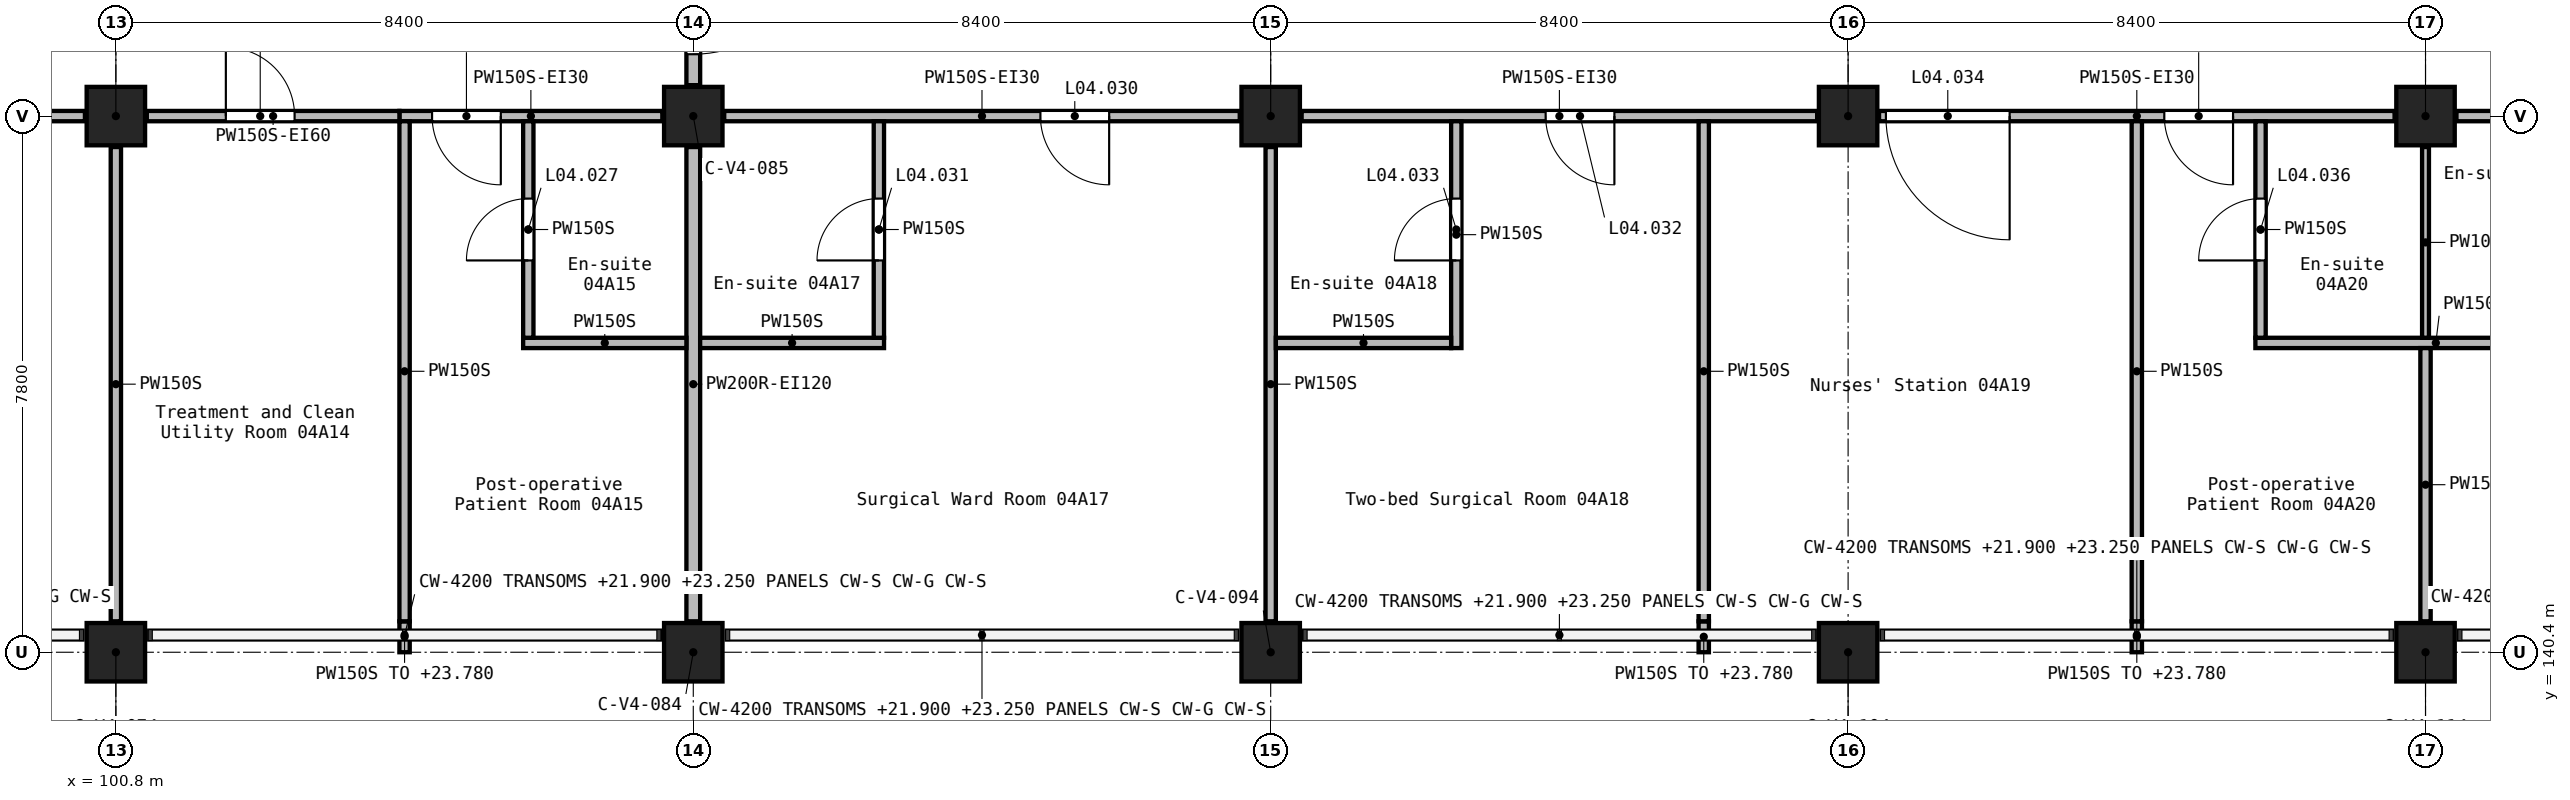
"""IFC4 building model, lengths in metres.
Left out: names, types, materials, properties, quantities, classifications, styles, units other than length and angle.
Written with IfcOpenShell. Run it as: python <this file> out.ifc"""

import sys

from ifc_helpers import new_model, si_unit, direction, frame, frame_2d, origin, origin_2d, place, context, subcontext, project, spatial, rectangle, extrude, element, fill, save


model = new_model("IFC4")
c1 = context("Model", 3, precision=1e-05, world=origin(), true_north=direction((0.0, 1.0)))
c2 = subcontext(c1, "Body", "Model", "MODEL_VIEW")
j1 = project(units=[si_unit("LENGTHUNIT", "METRE"), si_unit("PLANEANGLEUNIT", "RADIAN")], contexts=[c1])
p1 = place(None, origin())
s1 = spatial("IfcSite", under=j1, at=p1, CompositionType="ELEMENT")
p2 = place(p1, origin())
s2 = spatial("IfcBuilding", under=s1, at=p2, CompositionType="ELEMENT")
p3 = place(p2, frame((0.0, 0.0, 21.0)))
s3 = spatial("IfcBuildingStorey", under=s2, at=p3, CompositionType="ELEMENT", Elevation=21.0)
for number, where, z_axis, x_axis in (
    (1, (100.8, 140.4, 0.0), (0.0, 0.0, 1.0), (1.0, 0.0, 0.0)),
    (2, (100.8, 148.2, 0.0), (0.0, 0.0, 1.0), (1.0, 0.0, 0.0)),
    (3, (109.2, 140.4, 0.0), (0.0, 0.0, 1.0), (1.0, 0.0, 0.0)),
    (4, (109.2, 148.2, 0.0), (0.0, 0.0, 1.0), (1.0, 0.0, 0.0)),
    (5, (117.6, 140.4, 0.0), (0.0, 0.0, 1.0), (1.0, 0.0, 0.0)),
    (6, (117.6, 148.2, 0.0), (0.0, 0.0, 1.0), (1.0, 0.0, 0.0)),
    (7, (126.0, 140.4, 0.0), (0.0, 0.0, 1.0), (1.0, 0.0, 0.0)),
    (8, (126.0, 148.2, 0.0), (0.0, 0.0, 1.0), (1.0, 0.0, 0.0)),
    (9, (134.4, 140.4, 0.0), (0.0, 0.0, 1.0), (1.0, 0.0, 0.0)),
    (10, (134.4, 148.2, 0.0), (0.0, 0.0, 1.0), (1.0, 0.0, 0.0)),
):
    element("IfcColumn", number, at=place(p3, frame(where, z_axis=z_axis, x_axis=x_axis)), inside=s3, PredefinedType="COLUMN", context=c2, shape_type="SweptSolid", body=[
        extrude(rectangle(XDim=0.85, YDim=0.85, at=origin_2d()), origin(), (0.0, 0.0, 1.0), 3.9),
    ])
p4 = place(p3, frame((109.2, 151.35, 0.0), z_axis=(0.0, 0.0, 1.0), x_axis=(0.0, -1.0, 0.0)))
e11 = element("IfcWall", 11, at=p4, inside=s3, PredefinedType="SOLIDWALL", context=c2, shape_type="SweptSolid", body=[
    extrude(rectangle(XDim=2.7, YDim=0.2, at=frame_2d((1.35, 0.0))), origin(), (0.0, 0.0, 1.0), 3.6),
])
p5 = place(p4, frame((0.45, 0.0, 0.0)))
e12 = element("IfcOpeningElement", 12, at=p5, cuts=e11, PredefinedType="OPENING", context=c2, shape_type="SweptSolid", body=[
    extrude(rectangle(XDim=1.8, YDim=2.1, at=frame_2d((0.9, 1.05))), frame((0.0, 0.11, 0.0), z_axis=(0.0, -1.0, 0.0), x_axis=(1.0, 0.0, 0.0)), (0.0, 0.0, 1.0), 0.22),
])
p6 = place(p3, frame((109.2, 147.75, 0.0), z_axis=(0.0, 0.0, 1.0), x_axis=(0.0, -1.0, 0.0)))
e13 = element("IfcWall", 13, at=p6, inside=s3, PredefinedType="SOLIDWALL", context=c2, shape_type="SweptSolid", body=[
    extrude(rectangle(XDim=6.9, YDim=0.2, at=frame_2d((3.45, 0.0))), origin(), (0.0, 0.0, 1.0), 3.6),
])
p7 = place(p3, frame((142.35, 148.2, 0.0), z_axis=(0.0, 0.0, 1.0), x_axis=(-1.0, 0.0, 0.0)))
e14 = element("IfcWall", 14, at=p7, inside=s3, PredefinedType="PARTITIONING", context=c2, shape_type="SweptSolid", body=[
    extrude(rectangle(XDim=7.5, YDim=0.15, at=frame_2d((3.75, 0.0))), origin(), (0.0, 0.0, 1.0), 3.6),
])
p8 = place(p7, frame((1.9, 0.0, 0.0)))
e15 = element("IfcOpeningElement", 15, at=p8, cuts=e14, PredefinedType="OPENING", context=c2, shape_type="SweptSolid", body=[
    extrude(rectangle(XDim=1.0, YDim=2.1, at=frame_2d((0.5, 1.05))), frame((0.0, 0.085, 0.0), z_axis=(0.0, -1.0, 0.0), x_axis=(1.0, 0.0, 0.0)), (0.0, 0.0, 1.0), 0.17),
])
p9 = place(p3, frame((133.95, 148.2, 0.0), z_axis=(0.0, 0.0, 1.0), x_axis=(-1.0, 0.0, 0.0)))
e16 = element("IfcWall", 16, at=p9, inside=s3, PredefinedType="PARTITIONING", context=c2, shape_type="SweptSolid", body=[
    extrude(rectangle(XDim=7.5, YDim=0.15, at=frame_2d((3.75, 0.0))), origin(), (0.0, 0.0, 1.0), 3.6),
])
p10 = place(p9, frame((5.6, 0.0, 0.0)))
e17 = element("IfcOpeningElement", 17, at=p10, cuts=e16, PredefinedType="OPENING", context=c2, shape_type="SweptSolid", body=[
    extrude(rectangle(XDim=1.8, YDim=2.1, at=frame_2d((0.9, 1.05))), frame((0.0, 0.085, 0.0), z_axis=(0.0, -1.0, 0.0), x_axis=(1.0, 0.0, 0.0)), (0.0, 0.0, 1.0), 0.17),
])
p11 = place(p9, frame((2.35, 0.0, 0.0)))
e18 = element("IfcOpeningElement", 18, at=p11, cuts=e16, PredefinedType="OPENING", context=c2, shape_type="SweptSolid", body=[
    extrude(rectangle(XDim=1.0, YDim=2.1, at=frame_2d((0.5, 1.05))), frame((0.0, 0.085, 0.0), z_axis=(0.0, -1.0, 0.0), x_axis=(1.0, 0.0, 0.0)), (0.0, 0.0, 1.0), 0.17),
])
p12 = place(p3, frame((125.55, 148.2, 0.0), z_axis=(0.0, 0.0, 1.0), x_axis=(-1.0, 0.0, 0.0)))
e19 = element("IfcWall", 19, at=p12, inside=s3, PredefinedType="PARTITIONING", context=c2, shape_type="SweptSolid", body=[
    extrude(rectangle(XDim=7.5, YDim=0.15, at=frame_2d((3.75, 0.0))), origin(), (0.0, 0.0, 1.0), 3.6),
])
p13 = place(p12, frame((2.95, 0.0, 0.0)))
e20 = element("IfcOpeningElement", 20, at=p13, cuts=e19, PredefinedType="OPENING", context=c2, shape_type="SweptSolid", body=[
    extrude(rectangle(XDim=1.0, YDim=2.1, at=frame_2d((0.5, 1.05))), frame((0.0, 0.085, 0.0), z_axis=(0.0, -1.0, 0.0), x_axis=(1.0, 0.0, 0.0)), (0.0, 0.0, 1.0), 0.17),
])
p14 = place(p3, frame((117.15, 148.2, 0.0), z_axis=(0.0, 0.0, 1.0), x_axis=(-1.0, 0.0, 0.0)))
e21 = element("IfcWall", 21, at=p14, inside=s3, PredefinedType="PARTITIONING", context=c2, shape_type="SweptSolid", body=[
    extrude(rectangle(XDim=7.5, YDim=0.15, at=frame_2d((3.75, 0.0))), origin(), (0.0, 0.0, 1.0), 3.6),
])
p15 = place(p14, frame((1.9, 0.0, 0.0)))
e22 = element("IfcOpeningElement", 22, at=p15, cuts=e21, PredefinedType="OPENING", context=c2, shape_type="SweptSolid", body=[
    extrude(rectangle(XDim=1.0, YDim=2.1, at=frame_2d((0.5, 1.05))), frame((0.0, 0.085, 0.0), z_axis=(0.0, -1.0, 0.0), x_axis=(1.0, 0.0, 0.0)), (0.0, 0.0, 1.0), 0.17),
])
p16 = place(p3, frame((108.75, 148.2, 0.0), z_axis=(0.0, 0.0, 1.0), x_axis=(-1.0, 0.0, 0.0)))
e23 = element("IfcWall", 23, at=p16, inside=s3, PredefinedType="PARTITIONING", context=c2, shape_type="SweptSolid", body=[
    extrude(rectangle(XDim=3.825, YDim=0.15, at=frame_2d((1.913, 0.0))), origin(), (0.0, 0.0, 1.0), 3.6),
])
p17 = place(p16, frame((2.35, 0.0, 0.0)))
e24 = element("IfcOpeningElement", 24, at=p17, cuts=e23, PredefinedType="OPENING", context=c2, shape_type="SweptSolid", body=[
    extrude(rectangle(XDim=1.0, YDim=2.1, at=frame_2d((0.5, 1.05))), frame((0.0, 0.085, 0.0), z_axis=(0.0, -1.0, 0.0), x_axis=(1.0, 0.0, 0.0)), (0.0, 0.0, 1.0), 0.17),
])
p18 = place(p3, frame((100.35, 148.2, 0.0), z_axis=(0.0, 0.0, 1.0), x_axis=(-1.0, 0.0, 0.0)))
e25 = element("IfcWall", 25, at=p18, inside=s3, PredefinedType="PARTITIONING", context=c2, shape_type="SweptSolid", body=[
    extrude(rectangle(XDim=7.5, YDim=0.15, at=frame_2d((3.75, 0.0))), origin(), (0.0, 0.0, 1.0), 3.6),
])
p19 = place(p18, frame((1.9, 0.0, 0.0)))
e26 = element("IfcOpeningElement", 26, at=p19, cuts=e25, PredefinedType="OPENING", context=c2, shape_type="SweptSolid", body=[
    extrude(rectangle(XDim=1.0, YDim=2.1, at=frame_2d((0.5, 1.05))), frame((0.0, 0.085, 0.0), z_axis=(0.0, -1.0, 0.0), x_axis=(1.0, 0.0, 0.0)), (0.0, 0.0, 1.0), 0.17),
])
p20 = place(p3, frame((101.25, 148.2, 0.0), z_axis=(0.0, 0.0, 1.0), x_axis=(1.0, 0.0, 0.0)))
e27 = element("IfcWall", 27, at=p20, inside=s3, PredefinedType="PARTITIONING", context=c2, shape_type="SweptSolid", body=[
    extrude(rectangle(XDim=3.675, YDim=0.15, at=frame_2d((1.837, 0.0))), origin(), (0.0, 0.0, 1.0), 3.6),
])
p21 = place(p20, frame((1.15, 0.0, 0.0)))
e28 = element("IfcOpeningElement", 28, at=p21, cuts=e27, PredefinedType="OPENING", context=c2, shape_type="SweptSolid", body=[
    extrude(rectangle(XDim=1.0, YDim=2.1, at=frame_2d((0.5, 1.05))), frame((0.0, 0.085, 0.0), z_axis=(0.0, -1.0, 0.0), x_axis=(1.0, 0.0, 0.0)), (0.0, 0.0, 1.0), 0.17),
])
p22 = place(p3, frame((100.8, 140.85, 0.0), z_axis=(0.0, 0.0, 1.0), x_axis=(0.0, 1.0, 0.0)))
e29 = element("IfcWall", 29, at=p22, inside=s3, PredefinedType="PARTITIONING", context=c2, shape_type="SweptSolid", body=[
    extrude(rectangle(XDim=6.9, YDim=0.15, at=frame_2d((3.45, 0.0))), origin(), (0.0, 0.0, 1.0), 3.6),
])
p23 = place(p3, frame((105.0, 140.4, 0.0), z_axis=(0.0, 0.0, 1.0), x_axis=(0.0, 1.0, 0.0)))
e30 = element("IfcWall", 30, at=p23, inside=s3, PredefinedType="PARTITIONING", context=c2, shape_type="SweptSolid", body=[
    extrude(rectangle(XDim=0.45, YDim=0.15, at=frame_2d((0.225, 0.0))), origin(), (0.0, 0.0, 1.0), 2.78),
])
p24 = place(p3, frame((105.0, 140.85, 0.0), z_axis=(0.0, 0.0, 1.0), x_axis=(0.0, 1.0, 0.0)))
e31 = element("IfcWall", 31, at=p24, inside=s3, PredefinedType="PARTITIONING", context=c2, shape_type="SweptSolid", body=[
    extrude(rectangle(XDim=7.275, YDim=0.15, at=frame_2d((3.637, 0.0))), origin(), (0.0, 0.0, 1.0), 3.6),
])
p25 = place(p3, frame((117.6, 140.85, 0.0), z_axis=(0.0, 0.0, 1.0), x_axis=(0.0, 1.0, 0.0)))
e32 = element("IfcWall", 32, at=p25, inside=s3, PredefinedType="PARTITIONING", context=c2, shape_type="SweptSolid", body=[
    extrude(rectangle(XDim=6.9, YDim=0.15, at=frame_2d((3.45, 0.0))), origin(), (0.0, 0.0, 1.0), 3.6),
])
p26 = place(p3, frame((123.9, 140.4, 0.0), z_axis=(0.0, 0.0, 1.0), x_axis=(0.0, 1.0, 0.0)))
e33 = element("IfcWall", 33, at=p26, inside=s3, PredefinedType="PARTITIONING", context=c2, shape_type="SweptSolid", body=[
    extrude(rectangle(XDim=0.45, YDim=0.15, at=frame_2d((0.225, 0.0))), origin(), (0.0, 0.0, 1.0), 2.78),
])
p27 = place(p3, frame((123.9, 140.85, 0.0), z_axis=(0.0, 0.0, 1.0), x_axis=(0.0, 1.0, 0.0)))
e34 = element("IfcWall", 34, at=p27, inside=s3, PredefinedType="PARTITIONING", context=c2, shape_type="SweptSolid", body=[
    extrude(rectangle(XDim=7.275, YDim=0.15, at=frame_2d((3.637, 0.0))), origin(), (0.0, 0.0, 1.0), 3.6),
])
p28 = place(p3, frame((130.2, 140.4, 0.0), z_axis=(0.0, 0.0, 1.0), x_axis=(0.0, 1.0, 0.0)))
e35 = element("IfcWall", 35, at=p28, inside=s3, PredefinedType="PARTITIONING", context=c2, shape_type="SweptSolid", body=[
    extrude(rectangle(XDim=0.45, YDim=0.15, at=frame_2d((0.225, 0.0))), origin(), (0.0, 0.0, 1.0), 2.78),
])
p29 = place(p3, frame((130.2, 140.85, 0.0), z_axis=(0.0, 0.0, 1.0), x_axis=(0.0, 1.0, 0.0)))
e36 = element("IfcWall", 36, at=p29, inside=s3, PredefinedType="PARTITIONING", context=c2, shape_type="SweptSolid", body=[
    extrude(rectangle(XDim=7.275, YDim=0.15, at=frame_2d((3.637, 0.0))), origin(), (0.0, 0.0, 1.0), 3.6),
])
p30 = place(p3, frame((106.725, 144.9, 0.0), z_axis=(0.0, 0.0, 1.0), x_axis=(1.0, 0.0, 0.0)))
e37 = element("IfcWall", 37, at=p30, inside=s3, PredefinedType="PARTITIONING", context=c2, shape_type="SweptSolid", body=[
    extrude(rectangle(XDim=2.375, YDim=0.15, at=frame_2d((1.188, 0.0))), origin(), (0.0, 0.0, 1.0), 3.6),
])
p31 = place(p3, frame((109.3, 144.9, 0.0), z_axis=(0.0, 0.0, 1.0), x_axis=(1.0, 0.0, 0.0)))
e38 = element("IfcWall", 38, at=p31, inside=s3, PredefinedType="PARTITIONING", context=c2, shape_type="SweptSolid", body=[
    extrude(rectangle(XDim=2.675, YDim=0.15, at=frame_2d((1.337, 0.0))), origin(), (0.0, 0.0, 1.0), 3.6),
])
p32 = place(p3, frame((131.925, 144.9, 0.0), z_axis=(0.0, 0.0, 1.0), x_axis=(1.0, 0.0, 0.0)))
e39 = element("IfcWall", 39, at=p32, inside=s3, PredefinedType="PARTITIONING", context=c2, shape_type="SweptSolid", body=[
    extrude(rectangle(XDim=5.25, YDim=0.15, at=frame_2d((2.625, 0.0))), origin(), (0.0, 0.0, 1.0), 3.6),
])
p33 = place(p3, frame((134.4, 140.85, 0.0), z_axis=(0.0, 0.0, 1.0), x_axis=(0.0, 1.0, 0.0)))
e40 = element("IfcWall", 40, at=p33, inside=s3, PredefinedType="PARTITIONING", context=c2, shape_type="SweptSolid", body=[
    extrude(rectangle(XDim=3.975, YDim=0.15, at=frame_2d((1.987, 0.0))), origin(), (0.0, 0.0, 1.0), 3.6),
])
p34 = place(p3, frame((106.8, 144.975, 0.0), z_axis=(0.0, 0.0, 1.0), x_axis=(0.0, 1.0, 0.0)))
e41 = element("IfcWall", 41, at=p34, inside=s3, PredefinedType="PARTITIONING", context=c2, shape_type="SweptSolid", body=[
    extrude(rectangle(XDim=3.15, YDim=0.15, at=frame_2d((1.575, 0.0))), origin(), (0.0, 0.0, 1.0), 3.6),
])
p35 = place(p34, frame((1.125, 0.0, 0.0)))
e42 = element("IfcOpeningElement", 42, at=p35, cuts=e41, PredefinedType="OPENING", context=c2, shape_type="SweptSolid", body=[
    extrude(rectangle(XDim=0.9, YDim=2.1, at=frame_2d((0.45, 1.05))), frame((0.0, 0.085, 0.0), z_axis=(0.0, -1.0, 0.0), x_axis=(1.0, 0.0, 0.0)), (0.0, 0.0, 1.0), 0.17),
])
p36 = place(p3, frame((111.9, 144.975, 0.0), z_axis=(0.0, 0.0, 1.0), x_axis=(0.0, 1.0, 0.0)))
e43 = element("IfcWall", 43, at=p36, inside=s3, PredefinedType="PARTITIONING", context=c2, shape_type="SweptSolid", body=[
    extrude(rectangle(XDim=3.15, YDim=0.15, at=frame_2d((1.575, 0.0))), origin(), (0.0, 0.0, 1.0), 3.6),
])
p37 = place(p36, frame((1.125, 0.0, 0.0)))
e44 = element("IfcOpeningElement", 44, at=p37, cuts=e43, PredefinedType="OPENING", context=c2, shape_type="SweptSolid", body=[
    extrude(rectangle(XDim=0.9, YDim=2.1, at=frame_2d((0.45, 1.05))), frame((0.0, 0.085, 0.0), z_axis=(0.0, -1.0, 0.0), x_axis=(1.0, 0.0, 0.0)), (0.0, 0.0, 1.0), 0.17),
])
p38 = place(p3, frame((120.3, 144.825, 0.0), z_axis=(0.0, 0.0, 1.0), x_axis=(0.0, 1.0, 0.0)))
e45 = element("IfcWall", 45, at=p38, inside=s3, PredefinedType="PARTITIONING", context=c2, shape_type="SweptSolid", body=[
    extrude(rectangle(XDim=3.3, YDim=0.15, at=frame_2d((1.65, 0.0))), origin(), (0.0, 0.0, 1.0), 3.6),
])
p39 = place(p38, frame((1.275, 0.0, 0.0)))
e46 = element("IfcOpeningElement", 46, at=p39, cuts=e45, PredefinedType="OPENING", context=c2, shape_type="SweptSolid", body=[
    extrude(rectangle(XDim=0.9, YDim=2.1, at=frame_2d((0.45, 1.05))), frame((0.0, 0.085, 0.0), z_axis=(0.0, -1.0, 0.0), x_axis=(1.0, 0.0, 0.0)), (0.0, 0.0, 1.0), 0.17),
])
p40 = place(p3, frame((132.0, 144.975, 0.0), z_axis=(0.0, 0.0, 1.0), x_axis=(0.0, 1.0, 0.0)))
e47 = element("IfcWall", 47, at=p40, inside=s3, PredefinedType="PARTITIONING", context=c2, shape_type="SweptSolid", body=[
    extrude(rectangle(XDim=3.15, YDim=0.15, at=frame_2d((1.575, 0.0))), origin(), (0.0, 0.0, 1.0), 3.6),
])
p41 = place(p40, frame((1.125, 0.0, 0.0)))
e48 = element("IfcOpeningElement", 48, at=p41, cuts=e47, PredefinedType="OPENING", context=c2, shape_type="SweptSolid", body=[
    extrude(rectangle(XDim=0.9, YDim=2.1, at=frame_2d((0.45, 1.05))), frame((0.0, 0.085, 0.0), z_axis=(0.0, -1.0, 0.0), x_axis=(1.0, 0.0, 0.0)), (0.0, 0.0, 1.0), 0.17),
])
p42 = place(p3, frame((117.675, 144.9, 0.0), z_axis=(0.0, 0.0, 1.0), x_axis=(1.0, 0.0, 0.0)))
e49 = element("IfcWall", 49, at=p42, inside=s3, PredefinedType="PARTITIONING", context=c2, shape_type="SweptSolid", body=[
    extrude(rectangle(XDim=2.55, YDim=0.15, at=frame_2d((1.275, 0.0))), origin(), (0.0, 0.0, 1.0), 3.6),
])
p43 = place(p3, frame((134.4, 144.975, 0.0), z_axis=(0.0, 0.0, 1.0), x_axis=(0.0, 1.0, 0.0)))
e50 = element("IfcWall", 50, at=p43, inside=s3, PredefinedType="PARTITIONING", context=c2, shape_type="SweptSolid", body=[
    extrude(rectangle(XDim=2.775, YDim=0.1, at=frame_2d((1.387, 0.0))), origin(), (0.0, 0.0, 1.0), 3.6),
])
p44 = place(p5, origin())
e51 = element("IfcDoor", 51, at=p44, inside=s3, OperationType="DOUBLE_DOOR_SINGLE_SWING", PredefinedType="DOOR", context=c2, shape_type="SweptSolid", body=[
    extrude(rectangle(XDim=1.8, YDim=2.1, at=frame_2d((0.9, 1.05))), frame((0.0, 0.025, 0.0), z_axis=(0.0, -1.0, 0.0), x_axis=(1.0, 0.0, 0.0)), (0.0, 0.0, 1.0), 0.05),
])
fill(e12, e51)
p45 = place(p21, frame((1.0, 0.0, 0.0), z_axis=(0.0, 0.0, 1.0), x_axis=(-1.0, 0.0, 0.0)))
e52 = element("IfcDoor", 52, at=p45, inside=s3, OperationType="SINGLE_SWING_RIGHT", PredefinedType="DOOR", context=c2, shape_type="SweptSolid", body=[
    extrude(rectangle(XDim=1.0, YDim=2.1, at=frame_2d((0.5, 1.05))), frame((0.0, 0.025, 0.0), z_axis=(0.0, -1.0, 0.0), x_axis=(1.0, 0.0, 0.0)), (0.0, 0.0, 1.0), 0.05),
])
fill(e28, e52)
p46 = place(p17, origin())
e53 = element("IfcDoor", 53, at=p46, inside=s3, OperationType="SINGLE_SWING_RIGHT", PredefinedType="DOOR", context=c2, shape_type="SweptSolid", body=[
    extrude(rectangle(XDim=1.0, YDim=2.1, at=frame_2d((0.5, 1.05))), frame((0.0, 0.025, 0.0), z_axis=(0.0, -1.0, 0.0), x_axis=(1.0, 0.0, 0.0)), (0.0, 0.0, 1.0), 0.05),
])
fill(e24, e53)
p47 = place(p35, frame((0.9, 0.0, 0.0), z_axis=(0.0, 0.0, 1.0), x_axis=(-1.0, 0.0, 0.0)))
e54 = element("IfcDoor", 54, at=p47, inside=s3, OperationType="SINGLE_SWING_LEFT", PredefinedType="DOOR", context=c2, shape_type="SweptSolid", body=[
    extrude(rectangle(XDim=0.9, YDim=2.1, at=frame_2d((0.45, 1.05))), frame((0.0, 0.025, 0.0), z_axis=(0.0, -1.0, 0.0), x_axis=(1.0, 0.0, 0.0)), (0.0, 0.0, 1.0), 0.05),
])
fill(e42, e54)
p48 = place(p15, origin())
e55 = element("IfcDoor", 55, at=p48, inside=s3, OperationType="SINGLE_SWING_LEFT", PredefinedType="DOOR", context=c2, shape_type="SweptSolid", body=[
    extrude(rectangle(XDim=1.0, YDim=2.1, at=frame_2d((0.5, 1.05))), frame((0.0, 0.025, 0.0), z_axis=(0.0, -1.0, 0.0), x_axis=(1.0, 0.0, 0.0)), (0.0, 0.0, 1.0), 0.05),
])
fill(e22, e55)
p49 = place(p37, origin())
e56 = element("IfcDoor", 56, at=p49, inside=s3, OperationType="SINGLE_SWING_RIGHT", PredefinedType="DOOR", context=c2, shape_type="SweptSolid", body=[
    extrude(rectangle(XDim=0.9, YDim=2.1, at=frame_2d((0.45, 1.05))), frame((0.0, 0.025, 0.0), z_axis=(0.0, -1.0, 0.0), x_axis=(1.0, 0.0, 0.0)), (0.0, 0.0, 1.0), 0.05),
])
fill(e44, e56)
p50 = place(p13, origin())
e57 = element("IfcDoor", 57, at=p50, inside=s3, OperationType="SINGLE_SWING_LEFT", PredefinedType="DOOR", context=c2, shape_type="SweptSolid", body=[
    extrude(rectangle(XDim=1.0, YDim=2.1, at=frame_2d((0.5, 1.05))), frame((0.0, 0.025, 0.0), z_axis=(0.0, -1.0, 0.0), x_axis=(1.0, 0.0, 0.0)), (0.0, 0.0, 1.0), 0.05),
])
fill(e20, e57)
p51 = place(p39, origin())
e58 = element("IfcDoor", 58, at=p51, inside=s3, OperationType="SINGLE_SWING_RIGHT", PredefinedType="DOOR", context=c2, shape_type="SweptSolid", body=[
    extrude(rectangle(XDim=0.9, YDim=2.1, at=frame_2d((0.45, 1.05))), frame((0.0, 0.025, 0.0), z_axis=(0.0, -1.0, 0.0), x_axis=(1.0, 0.0, 0.0)), (0.0, 0.0, 1.0), 0.05),
])
fill(e46, e58)
p52 = place(p10, origin())
e59 = element("IfcDoor", 59, at=p52, inside=s3, OperationType="DOUBLE_DOOR_SINGLE_SWING", PredefinedType="DOOR", context=c2, shape_type="SweptSolid", body=[
    extrude(rectangle(XDim=1.8, YDim=2.1, at=frame_2d((0.9, 1.05))), frame((0.0, 0.025, 0.0), z_axis=(0.0, -1.0, 0.0), x_axis=(1.0, 0.0, 0.0)), (0.0, 0.0, 1.0), 0.05),
])
fill(e17, e59)
p53 = place(p11, origin())
e60 = element("IfcDoor", 60, at=p53, inside=s3, OperationType="SINGLE_SWING_LEFT", PredefinedType="DOOR", context=c2, shape_type="SweptSolid", body=[
    extrude(rectangle(XDim=1.0, YDim=2.1, at=frame_2d((0.5, 1.05))), frame((0.0, 0.025, 0.0), z_axis=(0.0, -1.0, 0.0), x_axis=(1.0, 0.0, 0.0)), (0.0, 0.0, 1.0), 0.05),
])
fill(e18, e60)
p54 = place(p41, frame((0.9, 0.0, 0.0), z_axis=(0.0, 0.0, 1.0), x_axis=(-1.0, 0.0, 0.0)))
e61 = element("IfcDoor", 61, at=p54, inside=s3, OperationType="SINGLE_SWING_LEFT", PredefinedType="DOOR", context=c2, shape_type="SweptSolid", body=[
    extrude(rectangle(XDim=0.9, YDim=2.1, at=frame_2d((0.45, 1.05))), frame((0.0, 0.025, 0.0), z_axis=(0.0, -1.0, 0.0), x_axis=(1.0, 0.0, 0.0)), (0.0, 0.0, 1.0), 0.05),
])
fill(e48, e61)
save(model, sys.argv[1])
